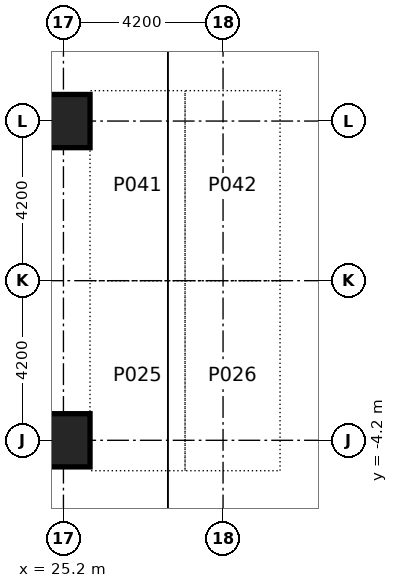
"""IFC4 building model, lengths in metres.
Left out: names, types, materials, properties, quantities, classifications, styles, units other than length and angle.
Written with IfcOpenShell. Run it as: python <this file> out.ifc"""

import sys

from ifc_helpers import new_model, si_unit, direction, frame, origin, origin_2d, place, context, subcontext, project, spatial, rectangle, extrude, element, save


model = new_model("IFC4")
c1 = context("Model", 3, precision=1e-05, world=origin(), true_north=direction((0.0, 1.0)))
c2 = subcontext(c1, "Body", "Model", "MODEL_VIEW")
j1 = project(units=[si_unit("LENGTHUNIT", "METRE"), si_unit("PLANEANGLEUNIT", "RADIAN")], contexts=[c1])
p1 = place(None, origin())
s1 = spatial("IfcSite", under=j1, at=p1, CompositionType="ELEMENT")
p2 = place(p1, origin())
s2 = spatial("IfcBuilding", under=s1, at=p2, CompositionType="ELEMENT")
p3 = place(p2, frame((0.0, 0.0, -8.4)))
s3 = spatial("IfcBuildingStorey", under=s2, at=p3, CompositionType="ELEMENT", Elevation=-8.4)
for number, where, z_axis, x_axis in (
    (1, (25.2, -4.2, 0.0), (0.0, 0.0, 1.0), (1.0, 0.0, 0.0)),
    (2, (25.2, 4.2, 0.0), (0.0, 0.0, 1.0), (1.0, 0.0, 0.0)),
):
    element("IfcColumn", number, at=place(p3, frame(where, z_axis=z_axis, x_axis=x_axis)), inside=s3, PredefinedType="COLUMN", context=c2, shape_type="SweptSolid", body=[
        extrude(rectangle(XDim=1.4, YDim=1.4, at=origin_2d()), origin(), (0.0, 0.0, 1.0), 3.85),
    ])
save(model, sys.argv[1])
